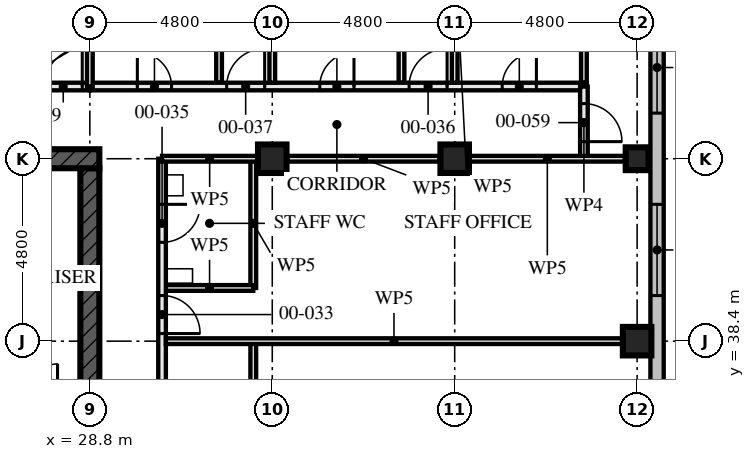
"""IFC4 building model, lengths in metres.
Left out: names, types, materials, properties, quantities, classifications, styles, units other than length and angle.
Written with IfcOpenShell. Run it as: python <this file> out.ifc"""

import sys

from ifc_helpers import new_model, si_unit, direction, frame, frame_2d, origin, origin_2d, place, context, subcontext, project, spatial, rectangle, hollow_rectangle, extrude, element, fill, save


model = new_model("IFC4")
c1 = context("Model", 3, precision=1e-05, world=origin(), true_north=direction((0.0, 1.0)))
c2 = subcontext(c1, "Body", "Model", "MODEL_VIEW")
j1 = project(units=[si_unit("LENGTHUNIT", "METRE"), si_unit("PLANEANGLEUNIT", "RADIAN")], contexts=[c1])
p1 = place(None, origin())
s1 = spatial("IfcSite", under=j1, at=p1, CompositionType="ELEMENT")
p2 = place(p1, origin())
s2 = spatial("IfcBuilding", under=s1, at=p2, CompositionType="ELEMENT")
p3 = place(p2, origin())
s3 = spatial("IfcBuildingStorey", under=s2, at=p3, CompositionType="ELEMENT", Elevation=0.0)
for number, where, z_axis, x_axis in (
    (1, (33.6, 43.2, 0.0), (0.0, 0.0, 1.0), (0.0, 1.0, 0.0)),
    (2, (38.4, 43.2, 0.0), (0.0, 0.0, 1.0), (0.0, 1.0, 0.0)),
    (3, (43.2, 38.4, 0.0), (0.0, 0.0, 1.0), (1.0, 0.0, 0.0)),
):
    element("IfcColumn", number, at=place(p3, frame(where, z_axis=z_axis, x_axis=x_axis)), inside=s3, PredefinedType="COLUMN", context=c2, shape_type="SweptSolid", body=[
        extrude(hollow_rectangle(XDim=0.75, YDim=0.75, WallThickness=0.08, at=origin_2d()), origin(), (0.0, 0.0, 1.0), 4.5),
    ])
p4 = place(p3, frame((43.2, 43.2, 0.0), z_axis=(0.0, 0.0, 1.0), x_axis=(0.0, 1.0, 0.0)))
e4 = element("IfcColumn", 4, at=p4, inside=s3, PredefinedType="COLUMN", context=c2, shape_type="SweptSolid", body=[
    extrude(hollow_rectangle(XDim=0.6, YDim=0.6, WallThickness=0.08, at=origin_2d()), origin(), (0.0, 0.0, 1.0), 4.5),
])
p5 = place(p3, frame((29.05, 43.2, -1.8), z_axis=(0.0, 0.0, 1.0), x_axis=(-1.0, 0.0, 0.0)))
e5 = element("IfcWall", 5, at=p5, inside=s3, PredefinedType="SHEAR", context=c2, shape_type="SweptSolid", body=[
    extrude(rectangle(XDim=14.9, YDim=0.5, at=frame_2d((7.45, 0.0))), origin(), (0.0, 0.0, 1.0), 6.13),
])
p6 = place(p5, frame((6.85, 0.0, 1.8)))
e6 = element("IfcOpeningElement", 6, at=p6, cuts=e5, PredefinedType="OPENING", context=c2, shape_type="SweptSolid", body=[
    extrude(rectangle(XDim=1.2, YDim=2.1, at=frame_2d((0.6, 1.05))), frame((0.0, 0.26, 0.0), z_axis=(0.0, -1.0, 0.0), x_axis=(1.0, 0.0, 0.0)), (0.0, 0.0, 1.0), 0.521),
])
p7 = place(p3, frame((28.8, 29.05, -1.8), z_axis=(0.0, 0.0, 1.0), x_axis=(0.0, 1.0, 0.0)))
e7 = element("IfcWall", 7, at=p7, inside=s3, PredefinedType="SHEAR", context=c2, shape_type="SweptSolid", body=[
    extrude(rectangle(XDim=13.9, YDim=0.5, at=frame_2d((6.95, 0.0))), origin(), (0.0, 0.0, 1.0), 6.13),
])
p8 = place(p7, frame((6.35, 0.0, 1.8)))
e8 = element("IfcOpeningElement", 8, at=p8, cuts=e7, PredefinedType="OPENING", context=c2, shape_type="SweptSolid", body=[
    extrude(rectangle(XDim=1.2, YDim=2.1, at=frame_2d((0.6, 1.05))), frame((0.0, 0.26, 0.0), z_axis=(0.0, -1.0, 0.0), x_axis=(1.0, 0.0, 0.0)), (0.0, 0.0, 1.0), 0.521),
])
p9 = place(p3, frame((43.725, 14.925, 0.0), z_axis=(0.0, 0.0, 1.0), x_axis=(0.0, 1.0, 0.0)))
e9 = element("IfcWall", 9, at=p9, inside=s3, PredefinedType="SOLIDWALL", context=c2, shape_type="SweptSolid", body=[
    extrude(rectangle(XDim=38.4, YDim=0.35, at=frame_2d((19.2, 0.0))), origin(), (0.0, 0.0, 1.0), 4.5),
])
p10 = place(p9, frame((15.675, 0.0, 0.0)))
e10 = element("IfcOpeningElement", 10, at=p10, cuts=e9, PredefinedType="OPENING", context=c2, shape_type="SweptSolid", body=[
    extrude(rectangle(XDim=1.2, YDim=2.4, at=frame_2d((0.6, 1.2))), frame((0.0, 0.186, 0.0), z_axis=(0.0, -1.0, 0.0), x_axis=(1.0, 0.0, 0.0)), (0.0, 0.0, 1.0), 0.371),
])
p11 = place(p9, frame((0.675, 0.0, 0.9)))
e11 = element("IfcOpeningElement", 11, at=p11, cuts=e9, PredefinedType="OPENING", context=c2, shape_type="SweptSolid", body=[
    extrude(rectangle(XDim=2.4, YDim=2.4, at=frame_2d((1.2, 1.2))), frame((0.0, 0.186, 0.0), z_axis=(0.0, -1.0, 0.0), x_axis=(1.0, 0.0, 0.0)), (0.0, 0.0, 1.0), 0.371),
])
p12 = place(p9, frame((5.475, 0.0, 0.9)))
e12 = element("IfcOpeningElement", 12, at=p12, cuts=e9, PredefinedType="OPENING", context=c2, shape_type="SweptSolid", body=[
    extrude(rectangle(XDim=2.4, YDim=2.4, at=frame_2d((1.2, 1.2))), frame((0.0, 0.186, 0.0), z_axis=(0.0, -1.0, 0.0), x_axis=(1.0, 0.0, 0.0)), (0.0, 0.0, 1.0), 0.371),
])
p13 = place(p9, frame((10.275, 0.0, 0.9)))
e13 = element("IfcOpeningElement", 13, at=p13, cuts=e9, PredefinedType="OPENING", context=c2, shape_type="SweptSolid", body=[
    extrude(rectangle(XDim=2.4, YDim=2.4, at=frame_2d((1.2, 1.2))), frame((0.0, 0.186, 0.0), z_axis=(0.0, -1.0, 0.0), x_axis=(1.0, 0.0, 0.0)), (0.0, 0.0, 1.0), 0.371),
])
p14 = place(p9, frame((19.875, 0.0, 0.9)))
e14 = element("IfcOpeningElement", 14, at=p14, cuts=e9, PredefinedType="OPENING", context=c2, shape_type="SweptSolid", body=[
    extrude(rectangle(XDim=2.4, YDim=2.4, at=frame_2d((1.2, 1.2))), frame((0.0, 0.186, 0.0), z_axis=(0.0, -1.0, 0.0), x_axis=(1.0, 0.0, 0.0)), (0.0, 0.0, 1.0), 0.371),
])
p15 = place(p9, frame((24.675, 0.0, 0.9)))
e15 = element("IfcOpeningElement", 15, at=p15, cuts=e9, PredefinedType="OPENING", context=c2, shape_type="SweptSolid", body=[
    extrude(rectangle(XDim=2.4, YDim=2.4, at=frame_2d((1.2, 1.2))), frame((0.0, 0.186, 0.0), z_axis=(0.0, -1.0, 0.0), x_axis=(1.0, 0.0, 0.0)), (0.0, 0.0, 1.0), 0.371),
])
p16 = place(p9, frame((29.475, 0.0, 0.9)))
e16 = element("IfcOpeningElement", 16, at=p16, cuts=e9, PredefinedType="OPENING", context=c2, shape_type="SweptSolid", body=[
    extrude(rectangle(XDim=2.4, YDim=2.4, at=frame_2d((1.2, 1.2))), frame((0.0, 0.186, 0.0), z_axis=(0.0, -1.0, 0.0), x_axis=(1.0, 0.0, 0.0)), (0.0, 0.0, 1.0), 0.371),
])
p17 = place(p9, frame((34.275, 0.0, 0.9)))
e17 = element("IfcOpeningElement", 17, at=p17, cuts=e9, PredefinedType="OPENING", context=c2, shape_type="SweptSolid", body=[
    extrude(rectangle(XDim=2.4, YDim=2.4, at=frame_2d((1.2, 1.2))), frame((0.0, 0.186, 0.0), z_axis=(0.0, -1.0, 0.0), x_axis=(1.0, 0.0, 0.0)), (0.0, 0.0, 1.0), 0.371),
])
p18 = place(p3, frame((28.8, 45.1, 0.0), z_axis=(0.0, 0.0, 1.0), x_axis=(-1.0, 0.0, 0.0)))
e18 = element("IfcWall", 18, at=p18, inside=s3, PredefinedType="PARTITIONING", context=c2, shape_type="SweptSolid", body=[
    extrude(rectangle(XDim=14.4, YDim=0.2, at=frame_2d((7.2, 0.0))), origin(), (0.0, 0.0, 1.0), 4.33),
])
p19 = place(p18, frame((0.2, 0.0, 0.0)))
e19 = element("IfcOpeningElement", 19, at=p19, cuts=e18, PredefinedType="OPENING", context=c2, shape_type="SweptSolid", body=[
    extrude(rectangle(XDim=1.0, YDim=2.4, at=frame_2d((0.5, 1.2))), frame((0.0, 0.111, 0.0), z_axis=(0.0, -1.0, 0.0), x_axis=(1.0, 0.0, 0.0)), (0.0, 0.0, 1.0), 0.221),
])
p20 = place(p18, frame((5.0, 0.0, 0.0)))
e20 = element("IfcOpeningElement", 20, at=p20, cuts=e18, PredefinedType="OPENING", context=c2, shape_type="SweptSolid", body=[
    extrude(rectangle(XDim=1.0, YDim=2.4, at=frame_2d((0.5, 1.2))), frame((0.0, 0.111, 0.0), z_axis=(0.0, -1.0, 0.0), x_axis=(1.0, 0.0, 0.0)), (0.0, 0.0, 1.0), 0.221),
])
p21 = place(p18, frame((9.8, 0.0, 0.0)))
e21 = element("IfcOpeningElement", 21, at=p21, cuts=e18, PredefinedType="OPENING", context=c2, shape_type="SweptSolid", body=[
    extrude(rectangle(XDim=1.0, YDim=2.4, at=frame_2d((0.5, 1.2))), frame((0.0, 0.111, 0.0), z_axis=(0.0, -1.0, 0.0), x_axis=(1.0, 0.0, 0.0)), (0.0, 0.0, 1.0), 0.221),
])
p22 = place(p18, frame((2.65, 0.0, 0.0)))
e22 = element("IfcOpeningElement", 22, at=p22, cuts=e18, PredefinedType="OPENING", context=c2, shape_type="SweptSolid", body=[
    extrude(rectangle(XDim=0.9, YDim=2.1, at=frame_2d((0.45, 1.05))), frame((0.0, 0.111, 0.0), z_axis=(0.0, -1.0, 0.0), x_axis=(1.0, 0.0, 0.0)), (0.0, 0.0, 1.0), 0.221),
])
p23 = place(p18, frame((7.45, 0.0, 0.0)))
e23 = element("IfcOpeningElement", 23, at=p23, cuts=e18, PredefinedType="OPENING", context=c2, shape_type="SweptSolid", body=[
    extrude(rectangle(XDim=0.9, YDim=2.1, at=frame_2d((0.45, 1.05))), frame((0.0, 0.111, 0.0), z_axis=(0.0, -1.0, 0.0), x_axis=(1.0, 0.0, 0.0)), (0.0, 0.0, 1.0), 0.221),
])
p24 = place(p18, frame((12.25, 0.0, 0.0)))
e24 = element("IfcOpeningElement", 24, at=p24, cuts=e18, PredefinedType="OPENING", context=c2, shape_type="SweptSolid", body=[
    extrude(rectangle(XDim=0.9, YDim=2.1, at=frame_2d((0.45, 1.05))), frame((0.0, 0.111, 0.0), z_axis=(0.0, -1.0, 0.0), x_axis=(1.0, 0.0, 0.0)), (0.0, 0.0, 1.0), 0.221),
])
p25 = place(p3, frame((33.1, 35.0, 0.0), z_axis=(0.0, 0.0, 1.0), x_axis=(0.0, 1.0, 0.0)))
e25 = element("IfcWall", 25, at=p25, inside=s3, PredefinedType="PARTITIONING", context=c2, shape_type="SweptSolid", body=[
    extrude(rectangle(XDim=3.4, YDim=0.15, at=frame_2d((1.7, 0.0))), origin(), (0.0, 0.0, 1.0), 4.33),
])
p26 = place(p3, frame((33.1, 39.8, 0.0), z_axis=(0.0, 0.0, 1.0), x_axis=(-1.0, 0.0, 0.0)))
e26 = element("IfcWall", 26, at=p26, inside=s3, PredefinedType="PARTITIONING", context=c2, shape_type="SweptSolid", body=[
    extrude(rectangle(XDim=2.3, YDim=0.15, at=frame_2d((1.15, 0.0))), origin(), (0.0, 0.0, 1.0), 4.33),
])
p27 = place(p3, frame((33.1, 39.8, 0.0), z_axis=(0.0, 0.0, 1.0), x_axis=(0.0, 1.0, 0.0)))
e27 = element("IfcWall", 27, at=p27, inside=s3, PredefinedType="PARTITIONING", context=c2, shape_type="SweptSolid", body=[
    extrude(rectangle(XDim=3.4, YDim=0.15, at=frame_2d((1.7, 0.0))), origin(), (0.0, 0.0, 1.0), 4.33),
])
p28 = place(p3, frame((42.805, 38.4, 0.0), z_axis=(0.0, 0.0, 1.0), x_axis=(-1.0, 0.0, 0.0)))
e28 = element("IfcWall", 28, at=p28, inside=s3, PredefinedType="PARTITIONING", context=c2, shape_type="SweptSolid", body=[
    extrude(rectangle(XDim=12.005, YDim=0.15, at=frame_2d((6.002, 0.0))), origin(), (0.0, 0.0, 1.0), 3.55),
])
p29 = place(p3, frame((30.7, 28.8, 0.0), z_axis=(0.0, 0.0, 1.0), x_axis=(0.0, 1.0, 0.0)))
e29 = element("IfcWall", 29, at=p29, inside=s3, PredefinedType="PARTITIONING", context=c2, shape_type="SweptSolid", body=[
    extrude(rectangle(XDim=14.4, YDim=0.2, at=frame_2d((7.2, 0.0))), origin(), (0.0, 0.0, 1.0), 3.55),
])
p30 = place(p29, frame((3.462, 0.0, 0.0)))
e30 = element("IfcOpeningElement", 30, at=p30, cuts=e29, PredefinedType="OPENING", context=c2, shape_type="SweptSolid", body=[
    extrude(rectangle(XDim=1.2, YDim=2.4, at=frame_2d((0.6, 1.2))), frame((0.0, 0.111, 0.0), z_axis=(0.0, -1.0, 0.0), x_axis=(1.0, 0.0, 0.0)), (0.0, 0.0, 1.0), 0.221),
])
p31 = place(p29, frame((5.0, 0.0, 0.0)))
e31 = element("IfcOpeningElement", 31, at=p31, cuts=e29, PredefinedType="OPENING", context=c2, shape_type="SweptSolid", body=[
    extrude(rectangle(XDim=1.0, YDim=2.4, at=frame_2d((0.5, 1.2))), frame((0.0, 0.111, 0.0), z_axis=(0.0, -1.0, 0.0), x_axis=(1.0, 0.0, 0.0)), (0.0, 0.0, 1.0), 0.221),
])
p32 = place(p29, frame((9.8, 0.0, 0.0)))
e32 = element("IfcOpeningElement", 32, at=p32, cuts=e29, PredefinedType="OPENING", context=c2, shape_type="SweptSolid", body=[
    extrude(rectangle(XDim=1.0, YDim=2.4, at=frame_2d((0.5, 1.2))), frame((0.0, 0.111, 0.0), z_axis=(0.0, -1.0, 0.0), x_axis=(1.0, 0.0, 0.0)), (0.0, 0.0, 1.0), 0.221),
])
p33 = place(p29, frame((7.45, 0.0, 0.0)))
e33 = element("IfcOpeningElement", 33, at=p33, cuts=e29, PredefinedType="OPENING", context=c2, shape_type="SweptSolid", body=[
    extrude(rectangle(XDim=0.9, YDim=2.1, at=frame_2d((0.45, 1.05))), frame((0.0, 0.111, 0.0), z_axis=(0.0, -1.0, 0.0), x_axis=(1.0, 0.0, 0.0)), (0.0, 0.0, 1.0), 0.221),
])
p34 = place(p29, frame((12.2, 0.0, 0.0)))
e34 = element("IfcOpeningElement", 34, at=p34, cuts=e29, PredefinedType="OPENING", context=c2, shape_type="SweptSolid", body=[
    extrude(rectangle(XDim=1.0, YDim=2.1, at=frame_2d((0.5, 1.05))), frame((0.0, 0.111, 0.0), z_axis=(0.0, -1.0, 0.0), x_axis=(1.0, 0.0, 0.0)), (0.0, 0.0, 1.0), 0.221),
])
for number, where, z_axis, x_axis in (
    (35, (41.8, 48.6, 0.0), (0.0, 0.0, 1.0), (0.0, -1.0, 0.0)),
    (36, (37.0, 48.6, 0.0), (0.0, 0.0, 1.0), (0.0, -1.0, 0.0)),
    (37, (32.2, 48.6, 0.0), (0.0, 0.0, 1.0), (0.0, -1.0, 0.0)),
):
    element("IfcWall", number, at=place(p3, frame(where, z_axis=z_axis, x_axis=x_axis)), inside=s3, PredefinedType="PARTITIONING", context=c2, shape_type="SweptSolid", body=[
        extrude(rectangle(XDim=3.4, YDim=0.15, at=frame_2d((1.7, 0.0))), origin(), (0.0, 0.0, 1.0), 3.55),
    ])
p35 = place(p3, frame((38.4, 52.48, 0.0), z_axis=(0.0, 0.0, 1.0), x_axis=(0.0, -1.0, 0.0)))
e38 = element("IfcWall", 38, at=p35, inside=s3, PredefinedType="PARTITIONING", context=c2, shape_type="SweptSolid", body=[
    extrude(rectangle(XDim=7.28, YDim=0.15, at=frame_2d((3.64, 0.0))), origin(), (0.0, 0.0, 1.0), 3.55),
])
p36 = place(p3, frame((33.6, 57.28, 0.0), z_axis=(0.0, 0.0, 1.0), x_axis=(0.0, -1.0, 0.0)))
e39 = element("IfcWall", 39, at=p36, inside=s3, PredefinedType="PARTITIONING", context=c2, shape_type="SweptSolid", body=[
    extrude(rectangle(XDim=12.08, YDim=0.15, at=frame_2d((6.04, 0.0))), origin(), (0.0, 0.0, 1.0), 3.55),
])
p37 = place(p3, frame((41.8, 45.1, 0.0), z_axis=(0.0, 0.0, 1.0), x_axis=(-1.0, 0.0, 0.0)))
e40 = element("IfcWall", 40, at=p37, inside=s3, PredefinedType="PARTITIONING", context=c2, shape_type="SweptSolid", body=[
    extrude(rectangle(XDim=13.0, YDim=0.2, at=frame_2d((6.5, 0.0))), origin(), (0.0, 0.0, 1.0), 4.33),
])
p38 = place(p37, frame((3.6, 0.0, 0.0)))
e41 = element("IfcOpeningElement", 41, at=p38, cuts=e40, PredefinedType="OPENING", context=c2, shape_type="SweptSolid", body=[
    extrude(rectangle(XDim=1.0, YDim=2.4, at=frame_2d((0.5, 1.2))), frame((0.0, 0.111, 0.0), z_axis=(0.0, -1.0, 0.0), x_axis=(1.0, 0.0, 0.0)), (0.0, 0.0, 1.0), 0.221),
])
p39 = place(p37, frame((8.4, 0.0, 0.0)))
e42 = element("IfcOpeningElement", 42, at=p39, cuts=e40, PredefinedType="OPENING", context=c2, shape_type="SweptSolid", body=[
    extrude(rectangle(XDim=1.0, YDim=2.4, at=frame_2d((0.5, 1.2))), frame((0.0, 0.111, 0.0), z_axis=(0.0, -1.0, 0.0), x_axis=(1.0, 0.0, 0.0)), (0.0, 0.0, 1.0), 0.221),
])
p40 = place(p37, frame((1.25, 0.0, 0.0)))
e43 = element("IfcOpeningElement", 43, at=p40, cuts=e40, PredefinedType="OPENING", context=c2, shape_type="SweptSolid", body=[
    extrude(rectangle(XDim=0.9, YDim=2.1, at=frame_2d((0.45, 1.05))), frame((0.0, 0.111, 0.0), z_axis=(0.0, -1.0, 0.0), x_axis=(1.0, 0.0, 0.0)), (0.0, 0.0, 1.0), 0.221),
])
p41 = place(p37, frame((6.05, 0.0, 0.0)))
e44 = element("IfcOpeningElement", 44, at=p41, cuts=e40, PredefinedType="OPENING", context=c2, shape_type="SweptSolid", body=[
    extrude(rectangle(XDim=0.9, YDim=2.1, at=frame_2d((0.45, 1.05))), frame((0.0, 0.111, 0.0), z_axis=(0.0, -1.0, 0.0), x_axis=(1.0, 0.0, 0.0)), (0.0, 0.0, 1.0), 0.221),
])
p42 = place(p37, frame((10.85, 0.0, 0.0)))
e45 = element("IfcOpeningElement", 45, at=p42, cuts=e40, PredefinedType="OPENING", context=c2, shape_type="SweptSolid", body=[
    extrude(rectangle(XDim=0.9, YDim=2.1, at=frame_2d((0.45, 1.05))), frame((0.0, 0.111, 0.0), z_axis=(0.0, -1.0, 0.0), x_axis=(1.0, 0.0, 0.0)), (0.0, 0.0, 1.0), 0.221),
])
p43 = place(p3, frame((28.8, 45.1, 0.0), z_axis=(0.0, 0.0, 1.0), x_axis=(0.0, 1.0, 0.0)))
e46 = element("IfcWall", 46, at=p43, inside=s3, PredefinedType="PARTITIONING", context=c2, shape_type="SweptSolid", body=[
    extrude(rectangle(XDim=2.505, YDim=0.15, at=frame_2d((1.252, 0.0))), origin(), (0.0, 0.0, 1.0), 3.32),
])
p44 = place(p3, frame((42.88, 43.2, 0.0), z_axis=(0.0, 0.0, 1.0), x_axis=(-1.0, 0.0, 0.0)))
e47 = element("IfcWall", 47, at=p44, inside=s3, PredefinedType="PARTITIONING", context=c2, shape_type="SweptSolid", body=[
    extrude(rectangle(XDim=4.085, YDim=0.15, at=frame_2d((2.042, 0.0))), origin(), (0.0, 0.0, 1.0), 3.32),
])
p45 = place(p3, frame((38.005, 43.2, 0.0), z_axis=(0.0, 0.0, 1.0), x_axis=(-1.0, 0.0, 0.0)))
e48 = element("IfcWall", 48, at=p45, inside=s3, PredefinedType="PARTITIONING", context=c2, shape_type="SweptSolid", body=[
    extrude(rectangle(XDim=4.01, YDim=0.15, at=frame_2d((2.005, 0.0))), origin(), (0.0, 0.0, 1.0), 3.32),
])
p46 = place(p3, frame((33.205, 43.2, 0.0), z_axis=(0.0, 0.0, 1.0), x_axis=(-1.0, 0.0, 0.0)))
e49 = element("IfcWall", 49, at=p46, inside=s3, PredefinedType="PARTITIONING", context=c2, shape_type="SweptSolid", body=[
    extrude(rectangle(XDim=2.505, YDim=0.15, at=frame_2d((1.252, 0.0))), origin(), (0.0, 0.0, 1.0), 3.32),
])
p47 = place(p3, frame((41.8, 45.1, 0.0), z_axis=(0.0, 0.0, 1.0), x_axis=(0.0, -1.0, 0.0)))
e50 = element("IfcWall", 50, at=p47, inside=s3, PredefinedType="PARTITIONING", context=c2, shape_type="SweptSolid", body=[
    extrude(rectangle(XDim=1.9, YDim=0.2, at=frame_2d((0.95, 0.0))), origin(), (0.0, 0.0, 1.0), 4.33),
])
p48 = place(p47, frame((0.45, 0.0, 0.0)))
e51 = element("IfcOpeningElement", 51, at=p48, cuts=e50, PredefinedType="OPENING", context=c2, shape_type="SweptSolid", body=[
    extrude(rectangle(XDim=1.0, YDim=2.4, at=frame_2d((0.5, 1.2))), frame((0.0, 0.111, 0.0), z_axis=(0.0, -1.0, 0.0), x_axis=(1.0, 0.0, 0.0)), (0.0, 0.0, 1.0), 0.221),
])
p49 = place(p15, origin())
e52 = element("IfcWindow", 52, at=p49, inside=s3, PartitioningType="SINGLE_PANEL", PredefinedType="WINDOW", context=c2, shape_type="SweptSolid", body=[
    extrude(rectangle(XDim=2.4, YDim=2.4, at=frame_2d((1.2, 1.2))), frame((0.0, 0.03, 0.0), z_axis=(0.0, -1.0, 0.0), x_axis=(1.0, 0.0, 0.0)), (0.0, 0.0, 1.0), 0.06),
])
fill(e15, e52)
p50 = place(p16, origin())
e53 = element("IfcWindow", 53, at=p50, inside=s3, PartitioningType="SINGLE_PANEL", PredefinedType="WINDOW", context=c2, shape_type="SweptSolid", body=[
    extrude(rectangle(XDim=2.4, YDim=2.4, at=frame_2d((1.2, 1.2))), frame((0.0, 0.03, 0.0), z_axis=(0.0, -1.0, 0.0), x_axis=(1.0, 0.0, 0.0)), (0.0, 0.0, 1.0), 0.06),
])
fill(e16, e53)
p51 = place(p19, frame((1.0, 0.0, 0.0), z_axis=(0.0, 0.0, 1.0), x_axis=(-1.0, 0.0, 0.0)))
e54 = element("IfcDoor", 54, at=p51, inside=s3, OperationType="SINGLE_SWING_LEFT", PredefinedType="DOOR", context=c2, shape_type="SweptSolid", body=[
    extrude(rectangle(XDim=1.0, YDim=2.4, at=frame_2d((0.5, 1.2))), frame((0.0, 0.027, 0.0), z_axis=(0.0, -1.0, 0.0), x_axis=(1.0, 0.0, 0.0)), (0.0, 0.0, 1.0), 0.054),
])
fill(e19, e54)
p52 = place(p32, frame((1.0, 0.0, 0.0), z_axis=(0.0, 0.0, 1.0), x_axis=(-1.0, 0.0, 0.0)))
e55 = element("IfcDoor", 55, at=p52, inside=s3, OperationType="SINGLE_SWING_LEFT", PredefinedType="DOOR", context=c2, shape_type="SweptSolid", body=[
    extrude(rectangle(XDim=1.0, YDim=2.4, at=frame_2d((0.5, 1.2))), frame((0.0, 0.027, 0.0), z_axis=(0.0, -1.0, 0.0), x_axis=(1.0, 0.0, 0.0)), (0.0, 0.0, 1.0), 0.054),
])
fill(e32, e55)
p53 = place(p34, frame((1.0, 0.0, 0.0), z_axis=(0.0, 0.0, 1.0), x_axis=(-1.0, 0.0, 0.0)))
e56 = element("IfcDoor", 56, at=p53, inside=s3, OperationType="SINGLE_SWING_RIGHT", PredefinedType="DOOR", context=c2, shape_type="SweptSolid", body=[
    extrude(rectangle(XDim=1.0, YDim=2.1, at=frame_2d((0.5, 1.05))), frame((0.0, 0.027, 0.0), z_axis=(0.0, -1.0, 0.0), x_axis=(1.0, 0.0, 0.0)), (0.0, 0.0, 1.0), 0.054),
])
fill(e34, e56)
p54 = place(p38, frame((1.0, 0.0, 0.0), z_axis=(0.0, 0.0, 1.0), x_axis=(-1.0, 0.0, 0.0)))
e57 = element("IfcDoor", 57, at=p54, inside=s3, OperationType="SINGLE_SWING_LEFT", PredefinedType="DOOR", context=c2, shape_type="SweptSolid", body=[
    extrude(rectangle(XDim=1.0, YDim=2.4, at=frame_2d((0.5, 1.2))), frame((0.0, 0.027, 0.0), z_axis=(0.0, -1.0, 0.0), x_axis=(1.0, 0.0, 0.0)), (0.0, 0.0, 1.0), 0.054),
])
fill(e41, e57)
p55 = place(p39, frame((1.0, 0.0, 0.0), z_axis=(0.0, 0.0, 1.0), x_axis=(-1.0, 0.0, 0.0)))
e58 = element("IfcDoor", 58, at=p55, inside=s3, OperationType="SINGLE_SWING_LEFT", PredefinedType="DOOR", context=c2, shape_type="SweptSolid", body=[
    extrude(rectangle(XDim=1.0, YDim=2.4, at=frame_2d((0.5, 1.2))), frame((0.0, 0.027, 0.0), z_axis=(0.0, -1.0, 0.0), x_axis=(1.0, 0.0, 0.0)), (0.0, 0.0, 1.0), 0.054),
])
fill(e42, e58)
p56 = place(p40, frame((0.9, 0.0, 0.0), z_axis=(0.0, 0.0, 1.0), x_axis=(-1.0, 0.0, 0.0)))
e59 = element("IfcDoor", 59, at=p56, inside=s3, OperationType="SINGLE_SWING_LEFT", PredefinedType="DOOR", context=c2, shape_type="SweptSolid", body=[
    extrude(rectangle(XDim=0.9, YDim=2.1, at=frame_2d((0.45, 1.05))), frame((0.0, 0.027, 0.0), z_axis=(0.0, -1.0, 0.0), x_axis=(1.0, 0.0, 0.0)), (0.0, 0.0, 1.0), 0.054),
])
fill(e43, e59)
p57 = place(p41, frame((0.9, 0.0, 0.0), z_axis=(0.0, 0.0, 1.0), x_axis=(-1.0, 0.0, 0.0)))
e60 = element("IfcDoor", 60, at=p57, inside=s3, OperationType="SINGLE_SWING_LEFT", PredefinedType="DOOR", context=c2, shape_type="SweptSolid", body=[
    extrude(rectangle(XDim=0.9, YDim=2.1, at=frame_2d((0.45, 1.05))), frame((0.0, 0.027, 0.0), z_axis=(0.0, -1.0, 0.0), x_axis=(1.0, 0.0, 0.0)), (0.0, 0.0, 1.0), 0.054),
])
fill(e44, e60)
p58 = place(p42, frame((0.9, 0.0, 0.0), z_axis=(0.0, 0.0, 1.0), x_axis=(-1.0, 0.0, 0.0)))
e61 = element("IfcDoor", 61, at=p58, inside=s3, OperationType="SINGLE_SWING_RIGHT", PredefinedType="DOOR", context=c2, shape_type="SweptSolid", body=[
    extrude(rectangle(XDim=0.9, YDim=2.1, at=frame_2d((0.45, 1.05))), frame((0.0, 0.027, 0.0), z_axis=(0.0, -1.0, 0.0), x_axis=(1.0, 0.0, 0.0)), (0.0, 0.0, 1.0), 0.054),
])
fill(e45, e61)
p59 = place(p48, origin())
e62 = element("IfcDoor", 62, at=p59, inside=s3, OperationType="SINGLE_SWING_LEFT", PredefinedType="DOOR", context=c2, shape_type="SweptSolid", body=[
    extrude(rectangle(XDim=1.0, YDim=2.4, at=frame_2d((0.5, 1.2))), frame((0.0, 0.027, 0.0), z_axis=(0.0, -1.0, 0.0), x_axis=(1.0, 0.0, 0.0)), (0.0, 0.0, 1.0), 0.054),
])
fill(e51, e62)
save(model, sys.argv[1])
